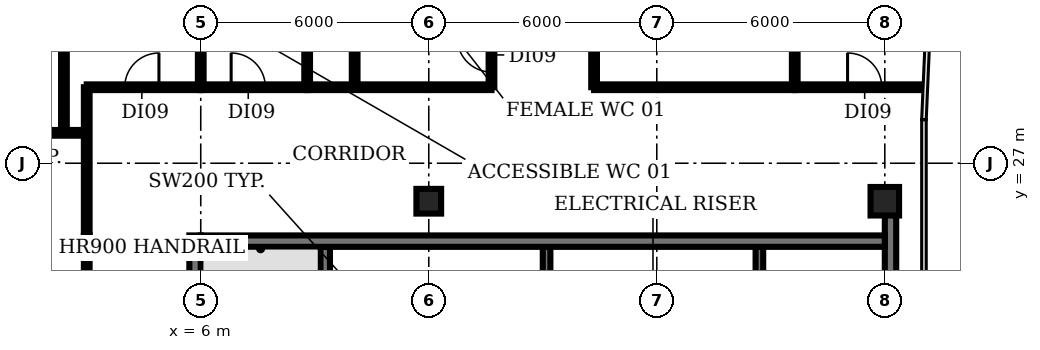
"""IFC4 building model, lengths in metres.
Left out: names, types, materials, properties, quantities, classifications, styles, units other than length and angle.
Written with IfcOpenShell. Run it as: python <this file> out.ifc"""

import sys

from ifc_helpers import new_model, si_unit, direction, frame, frame_2d, origin, origin_2d, place, context, subcontext, project, spatial, rectangle, extrude, element, fill, save


model = new_model("IFC4")
c1 = context("Model", 3, precision=1e-05, world=origin(), true_north=direction((0.0, 1.0)))
c2 = subcontext(c1, "Body", "Model", "MODEL_VIEW")
j1 = project(units=[si_unit("LENGTHUNIT", "METRE"), si_unit("PLANEANGLEUNIT", "RADIAN")], contexts=[c1])
p1 = place(None, origin())
s1 = spatial("IfcSite", under=j1, at=p1, CompositionType="ELEMENT")
p2 = place(p1, origin())
s2 = spatial("IfcBuilding", under=s1, at=p2, CompositionType="ELEMENT")
p3 = place(p2, frame((0.0, 0.0, 276.8)))
s3 = spatial("IfcBuildingStorey", under=s2, at=p3, CompositionType="ELEMENT", Elevation=276.8)
p4 = place(p3, frame((12.0, 26.0, 0.0), z_axis=(0.0, 0.0, 1.0), x_axis=(1.0, 0.0, 0.0)))
e1 = element("IfcColumn", 1, at=p4, inside=s3, PredefinedType="COLUMN", context=c2, shape_type="SweptSolid", body=[
    extrude(rectangle(XDim=0.65, YDim=0.65, at=origin_2d()), origin(), (0.0, 0.0, 1.0), 3.85),
])
p5 = place(p3, frame((24.0, 26.0, 0.0), z_axis=(0.0, 0.0, 1.0), x_axis=(1.0, 0.0, 0.0)))
e2 = element("IfcColumn", 2, at=p5, inside=s3, PredefinedType="COLUMN", context=c2, shape_type="SweptSolid", body=[
    extrude(rectangle(XDim=0.75, YDim=0.75, at=origin_2d()), origin(), (0.0, 0.0, 1.0), 3.85),
])
p6 = place(p3, frame((9.275, 18.375, 0.0), z_axis=(0.0, 0.0, 1.0), x_axis=(0.0, 1.0, 0.0)))
e3 = element("IfcWall", 3, at=p6, inside=s3, PredefinedType="SHEAR", context=c2, shape_type="SweptSolid", body=[
    extrude(rectangle(XDim=6.425, YDim=0.25, at=frame_2d((3.212, 0.0))), origin(), (0.0, 0.0, 1.0), 3.85),
])
for number, where, z_axis, x_axis in (
    (4, (15.1, 22.9, 0.0), (0.0, 0.0, 1.0), (0.0, 1.0, 0.0)),
    (5, (20.7, 22.9, 0.0), (0.0, 0.0, 1.0), (0.0, 1.0, 0.0)),
):
    element("IfcWall", number, at=place(p3, frame(where, z_axis=z_axis, x_axis=x_axis)), inside=s3, PredefinedType="SHEAR", context=c2, shape_type="SweptSolid", body=[
        extrude(rectangle(XDim=1.9, YDim=0.2, at=frame_2d((0.95, 0.0))), origin(), (0.0, 0.0, 1.0), 3.85),
    ])
p7 = place(p3, frame((5.85, 5.1, 0.0), z_axis=(0.0, 0.0, 1.0), x_axis=(0.0, 1.0, 0.0)))
e6 = element("IfcWall", 6, at=p7, inside=s3, PredefinedType="SHEAR", context=c2, shape_type="SweptSolid", body=[
    extrude(rectangle(XDim=20.0, YDim=0.3, at=frame_2d((10.0, 0.0))), origin(), (0.0, 0.0, 1.0), 3.85),
])
p8 = place(p7, frame((0.55, 0.0, 0.0)))
e7 = element("IfcOpeningElement", 7, at=p8, cuts=e6, PredefinedType="OPENING", context=c2, shape_type="SweptSolid", body=[
    extrude(rectangle(XDim=1.5, YDim=2.1, at=frame_2d((0.75, 1.05))), frame((0.0, 0.16, 0.0), z_axis=(0.0, -1.0, 0.0), x_axis=(1.0, 0.0, 0.0)), (0.0, 0.0, 1.0), 0.32),
])
p9 = place(p7, frame((7.0, 0.0, 0.0)))
e8 = element("IfcOpeningElement", 8, at=p9, cuts=e6, PredefinedType="OPENING", context=c2, shape_type="SweptSolid", body=[
    extrude(rectangle(XDim=1.2, YDim=2.1, at=frame_2d((0.6, 1.05))), frame((0.0, 0.16, 0.0), z_axis=(0.0, -1.0, 0.0), x_axis=(1.0, 0.0, 0.0)), (0.0, 0.0, 1.0), 0.32),
])
p10 = place(p7, frame((13.55, 0.0, 0.0)))
e9 = element("IfcOpeningElement", 9, at=p10, cuts=e6, PredefinedType="OPENING", context=c2, shape_type="SweptSolid", body=[
    extrude(rectangle(XDim=1.2, YDim=2.1, at=frame_2d((0.6, 1.05))), frame((0.0, 0.16, 0.0), z_axis=(0.0, -1.0, 0.0), x_axis=(1.0, 0.0, 0.0)), (0.0, 0.0, 1.0), 0.32),
])
p11 = place(p3, frame((24.15, 25.655, 0.0), z_axis=(0.0, 0.0, 1.0), x_axis=(0.0, -1.0, 0.0)))
e10 = element("IfcWall", 10, at=p11, inside=s3, PredefinedType="SHEAR", context=c2, shape_type="SweptSolid", body=[
    extrude(rectangle(XDim=20.555, YDim=0.3, at=frame_2d((10.277, 0.0))), origin(), (0.0, 0.0, 1.0), 3.85),
])
p12 = place(p11, frame((18.505, 0.0, 0.0)))
e11 = element("IfcOpeningElement", 11, at=p12, cuts=e10, PredefinedType="OPENING", context=c2, shape_type="SweptSolid", body=[
    extrude(rectangle(XDim=1.5, YDim=2.1, at=frame_2d((0.75, 1.05))), frame((0.0, 0.16, 0.0), z_axis=(0.0, -1.0, 0.0), x_axis=(1.0, 0.0, 0.0)), (0.0, 0.0, 1.0), 0.32),
])
p13 = place(p11, frame((12.405, 0.0, 0.0)))
e12 = element("IfcOpeningElement", 12, at=p13, cuts=e10, PredefinedType="OPENING", context=c2, shape_type="SweptSolid", body=[
    extrude(rectangle(XDim=0.9, YDim=2.1, at=frame_2d((0.45, 1.05))), frame((0.0, 0.16, 0.0), z_axis=(0.0, -1.0, 0.0), x_axis=(1.0, 0.0, 0.0)), (0.0, 0.0, 1.0), 0.32),
])
p14 = place(p11, frame((6.405, 0.0, 0.0)))
e13 = element("IfcOpeningElement", 13, at=p14, cuts=e10, PredefinedType="OPENING", context=c2, shape_type="SweptSolid", body=[
    extrude(rectangle(XDim=2.0, YDim=2.1, at=frame_2d((1.0, 1.05))), frame((0.0, 0.16, 0.0), z_axis=(0.0, -1.0, 0.0), x_axis=(1.0, 0.0, 0.0)), (0.0, 0.0, 1.0), 0.32),
])
p15 = place(p3, frame((6.0, 24.95, 0.0), z_axis=(0.0, 0.0, 1.0), x_axis=(1.0, 0.0, 0.0)))
e14 = element("IfcWall", 14, at=p15, inside=s3, PredefinedType="SHEAR", context=c2, shape_type="SweptSolid", body=[
    extrude(rectangle(XDim=18.0, YDim=0.3, at=frame_2d((9.0, 0.0))), origin(), (0.0, 0.0, 1.0), 3.85),
])
p16 = place(p3, frame((-1.02, 27.8, 0.0), z_axis=(0.0, 0.0, 1.0), x_axis=(1.0, 0.0, 0.0)))
e15 = element("IfcWall", 15, at=p16, inside=s3, PredefinedType="PARTITIONING", context=c2, shape_type="SweptSolid", body=[
    extrude(rectangle(XDim=4.02, YDim=0.15, at=frame_2d((2.01, 0.0))), origin(), (0.0, 0.0, 1.0), 2.9),
])
p17 = place(p3, frame((2.4, 27.8, 0.0), z_axis=(0.0, 0.0, 1.0), x_axis=(0.0, 1.0, 0.0)))
e16 = element("IfcWall", 16, at=p17, inside=s3, PredefinedType="PARTITIONING", context=c2, shape_type="SweptSolid", body=[
    extrude(rectangle(XDim=6.0, YDim=0.15, at=frame_2d((3.0, 0.0))), origin(), (0.0, 0.0, 1.0), 2.9),
])
p18 = place(p3, frame((3.0, 5.1, 0.0), z_axis=(0.0, 0.0, 1.0), x_axis=(0.0, 1.0, 0.0)))
e17 = element("IfcWall", 17, at=p18, inside=s3, PredefinedType="PARTITIONING", context=c2, shape_type="SweptSolid", body=[
    extrude(rectangle(XDim=20.0, YDim=0.15, at=frame_2d((10.0, 0.0))), origin(), (0.0, 0.0, 1.0), 2.9),
])
p19 = place(p18, frame((9.3, 0.0, 0.0)))
e18 = element("IfcOpeningElement", 18, at=p19, cuts=e17, PredefinedType="OPENING", context=c2, shape_type="SweptSolid", body=[
    extrude(rectangle(XDim=1.2, YDim=2.1, at=frame_2d((0.6, 1.05))), frame((0.0, 0.085, 0.0), z_axis=(0.0, -1.0, 0.0), x_axis=(1.0, 0.0, 0.0)), (0.0, 0.0, 1.0), 0.17),
])
p20 = place(p3, frame((3.0, 25.1, 0.0), z_axis=(0.0, 0.0, 1.0), x_axis=(0.0, 1.0, 0.0)))
e19 = element("IfcWall", 19, at=p20, inside=s3, PredefinedType="PARTITIONING", context=c2, shape_type="SweptSolid", body=[
    extrude(rectangle(XDim=3.9, YDim=0.15, at=frame_2d((1.95, 0.0))), origin(), (0.0, 0.0, 1.0), 2.9),
])
p21 = place(p3, frame((3.0, 29.0, 0.0), z_axis=(0.0, 0.0, 1.0), x_axis=(1.0, 0.0, 0.0)))
e20 = element("IfcWall", 20, at=p21, inside=s3, PredefinedType="PARTITIONING", context=c2, shape_type="SweptSolid", body=[
    extrude(rectangle(XDim=3.0, YDim=0.15, at=frame_2d((1.5, 0.0))), origin(), (0.0, 0.0, 1.0), 2.9),
])
p22 = place(p21, frame((1.0, 0.0, 0.0)))
e21 = element("IfcOpeningElement", 21, at=p22, cuts=e20, PredefinedType="OPENING", context=c2, shape_type="SweptSolid", body=[
    extrude(rectangle(XDim=0.9, YDim=2.1, at=frame_2d((0.45, 1.05))), frame((0.0, 0.085, 0.0), z_axis=(0.0, -1.0, 0.0), x_axis=(1.0, 0.0, 0.0)), (0.0, 0.0, 1.0), 0.17),
])
p23 = place(p3, frame((6.0, 29.0, 0.0), z_axis=(0.0, 0.0, 1.0), x_axis=(0.0, 1.0, 0.0)))
e22 = element("IfcWall", 22, at=p23, inside=s3, PredefinedType="PARTITIONING", context=c2, shape_type="SweptSolid", body=[
    extrude(rectangle(XDim=4.8, YDim=0.15, at=frame_2d((2.4, 0.0))), origin(), (0.0, 0.0, 1.0), 2.9),
])
p24 = place(p3, frame((6.0, 29.0, 0.0), z_axis=(0.0, 0.0, 1.0), x_axis=(1.0, 0.0, 0.0)))
e23 = element("IfcWall", 23, at=p24, inside=s3, PredefinedType="PARTITIONING", context=c2, shape_type="SweptSolid", body=[
    extrude(rectangle(XDim=2.8, YDim=0.15, at=frame_2d((1.4, 0.0))), origin(), (0.0, 0.0, 1.0), 2.9),
])
p25 = place(p24, frame((0.8, 0.0, 0.0)))
e24 = element("IfcOpeningElement", 24, at=p25, cuts=e23, PredefinedType="OPENING", context=c2, shape_type="SweptSolid", body=[
    extrude(rectangle(XDim=0.9, YDim=2.1, at=frame_2d((0.45, 1.05))), frame((0.0, 0.085, 0.0), z_axis=(0.0, -1.0, 0.0), x_axis=(1.0, 0.0, 0.0)), (0.0, 0.0, 1.0), 0.17),
])
p26 = place(p3, frame((8.8, 29.0, 0.0), z_axis=(0.0, 0.0, 1.0), x_axis=(0.0, 1.0, 0.0)))
e25 = element("IfcWall", 25, at=p26, inside=s3, PredefinedType="PARTITIONING", context=c2, shape_type="SweptSolid", body=[
    extrude(rectangle(XDim=4.8, YDim=0.15, at=frame_2d((2.4, 0.0))), origin(), (0.0, 0.0, 1.0), 2.9),
])
p27 = place(p3, frame((8.8, 29.0, 0.0), z_axis=(0.0, 0.0, 1.0), x_axis=(1.0, 0.0, 0.0)))
e26 = element("IfcWall", 26, at=p27, inside=s3, PredefinedType="PARTITIONING", context=c2, shape_type="SweptSolid", body=[
    extrude(rectangle(XDim=4.85, YDim=0.15, at=frame_2d((2.425, 0.0))), origin(), (0.0, 0.0, 1.0), 2.9),
])
p28 = place(p3, frame((10.05, 29.0, 0.0), z_axis=(0.0, 0.0, 1.0), x_axis=(0.0, 1.0, 0.0)))
e27 = element("IfcWall", 27, at=p28, inside=s3, PredefinedType="PARTITIONING", context=c2, shape_type="SweptSolid", body=[
    extrude(rectangle(XDim=4.8, YDim=0.15, at=frame_2d((2.4, 0.0))), origin(), (0.0, 0.0, 1.0), 2.9),
])
p29 = place(p3, frame((13.65, 29.0, 0.0), z_axis=(0.0, 0.0, 1.0), x_axis=(0.0, 1.0, 0.0)))
e28 = element("IfcWall", 28, at=p29, inside=s3, PredefinedType="PARTITIONING", context=c2, shape_type="SweptSolid", body=[
    extrude(rectangle(XDim=4.8, YDim=0.15, at=frame_2d((2.4, 0.0))), origin(), (0.0, 0.0, 1.0), 2.9),
])
p30 = place(p29, frame((0.4, 0.0, 0.0)))
e29 = element("IfcOpeningElement", 29, at=p30, cuts=e28, PredefinedType="OPENING", context=c2, shape_type="SweptSolid", body=[
    extrude(rectangle(XDim=0.9, YDim=2.1, at=frame_2d((0.45, 1.05))), frame((0.0, 0.085, 0.0), z_axis=(0.0, -1.0, 0.0), x_axis=(1.0, 0.0, 0.0)), (0.0, 0.0, 1.0), 0.17),
])
p31 = place(p3, frame((16.35, 29.0, 0.0), z_axis=(0.0, 0.0, 1.0), x_axis=(0.0, 1.0, 0.0)))
e30 = element("IfcWall", 30, at=p31, inside=s3, PredefinedType="PARTITIONING", context=c2, shape_type="SweptSolid", body=[
    extrude(rectangle(XDim=4.8, YDim=0.15, at=frame_2d((2.4, 0.0))), origin(), (0.0, 0.0, 1.0), 2.9),
])
p32 = place(p3, frame((16.35, 29.0, 0.0), z_axis=(0.0, 0.0, 1.0), x_axis=(1.0, 0.0, 0.0)))
e31 = element("IfcWall", 31, at=p32, inside=s3, PredefinedType="PARTITIONING", context=c2, shape_type="SweptSolid", body=[
    extrude(rectangle(XDim=5.28, YDim=0.15, at=frame_2d((2.64, 0.0))), origin(), (0.0, 0.0, 1.0), 2.9),
])
p33 = place(p3, frame((21.63, 29.0, 0.0), z_axis=(0.0, 0.0, 1.0), x_axis=(0.0, 1.0, 0.0)))
e32 = element("IfcWall", 32, at=p33, inside=s3, PredefinedType="PARTITIONING", context=c2, shape_type="SweptSolid", body=[
    extrude(rectangle(XDim=4.8, YDim=0.15, at=frame_2d((2.4, 0.0))), origin(), (0.0, 0.0, 1.0), 2.9),
])
p34 = place(p3, frame((21.63, 29.0, 0.0), z_axis=(0.0, 0.0, 1.0), x_axis=(1.0, 0.0, 0.0)))
e33 = element("IfcWall", 33, at=p34, inside=s3, PredefinedType="PARTITIONING", context=c2, shape_type="SweptSolid", body=[
    extrude(rectangle(XDim=3.39, YDim=0.15, at=frame_2d((1.695, 0.0))), origin(), (0.0, 0.0, 1.0), 2.9),
])
p35 = place(p34, frame((1.39, 0.0, 0.0)))
e34 = element("IfcOpeningElement", 34, at=p35, cuts=e33, PredefinedType="OPENING", context=c2, shape_type="SweptSolid", body=[
    extrude(rectangle(XDim=0.9, YDim=2.1, at=frame_2d((0.45, 1.05))), frame((0.0, 0.085, 0.0), z_axis=(0.0, -1.0, 0.0), x_axis=(1.0, 0.0, 0.0)), (0.0, 0.0, 1.0), 0.17),
])
p36 = place(p22, origin())
e35 = element("IfcDoor", 35, at=p36, inside=s3, OperationType="SINGLE_SWING_RIGHT", PredefinedType="DOOR", context=c2, shape_type="SweptSolid", body=[
    extrude(rectangle(XDim=0.9, YDim=2.1, at=frame_2d((0.45, 1.05))), frame((0.0, 0.025, 0.0), z_axis=(0.0, -1.0, 0.0), x_axis=(1.0, 0.0, 0.0)), (0.0, 0.0, 1.0), 0.05),
])
fill(e21, e35)
p37 = place(p25, origin())
e36 = element("IfcDoor", 36, at=p37, inside=s3, OperationType="SINGLE_SWING_LEFT", PredefinedType="DOOR", context=c2, shape_type="SweptSolid", body=[
    extrude(rectangle(XDim=0.9, YDim=2.1, at=frame_2d((0.45, 1.05))), frame((0.0, 0.025, 0.0), z_axis=(0.0, -1.0, 0.0), x_axis=(1.0, 0.0, 0.0)), (0.0, 0.0, 1.0), 0.05),
])
fill(e24, e36)
p38 = place(p30, origin())
e37 = element("IfcDoor", 37, at=p38, inside=s3, OperationType="SINGLE_SWING_RIGHT", PredefinedType="DOOR", context=c2, shape_type="SweptSolid", body=[
    extrude(rectangle(XDim=0.9, YDim=2.1, at=frame_2d((0.45, 1.05))), frame((0.0, 0.025, 0.0), z_axis=(0.0, -1.0, 0.0), x_axis=(1.0, 0.0, 0.0)), (0.0, 0.0, 1.0), 0.05),
])
fill(e29, e37)
p39 = place(p35, origin())
e38 = element("IfcDoor", 38, at=p39, inside=s3, OperationType="SINGLE_SWING_LEFT", PredefinedType="DOOR", context=c2, shape_type="SweptSolid", body=[
    extrude(rectangle(XDim=0.9, YDim=2.1, at=frame_2d((0.45, 1.05))), frame((0.0, 0.025, 0.0), z_axis=(0.0, -1.0, 0.0), x_axis=(1.0, 0.0, 0.0)), (0.0, 0.0, 1.0), 0.05),
])
fill(e34, e38)
save(model, sys.argv[1])
